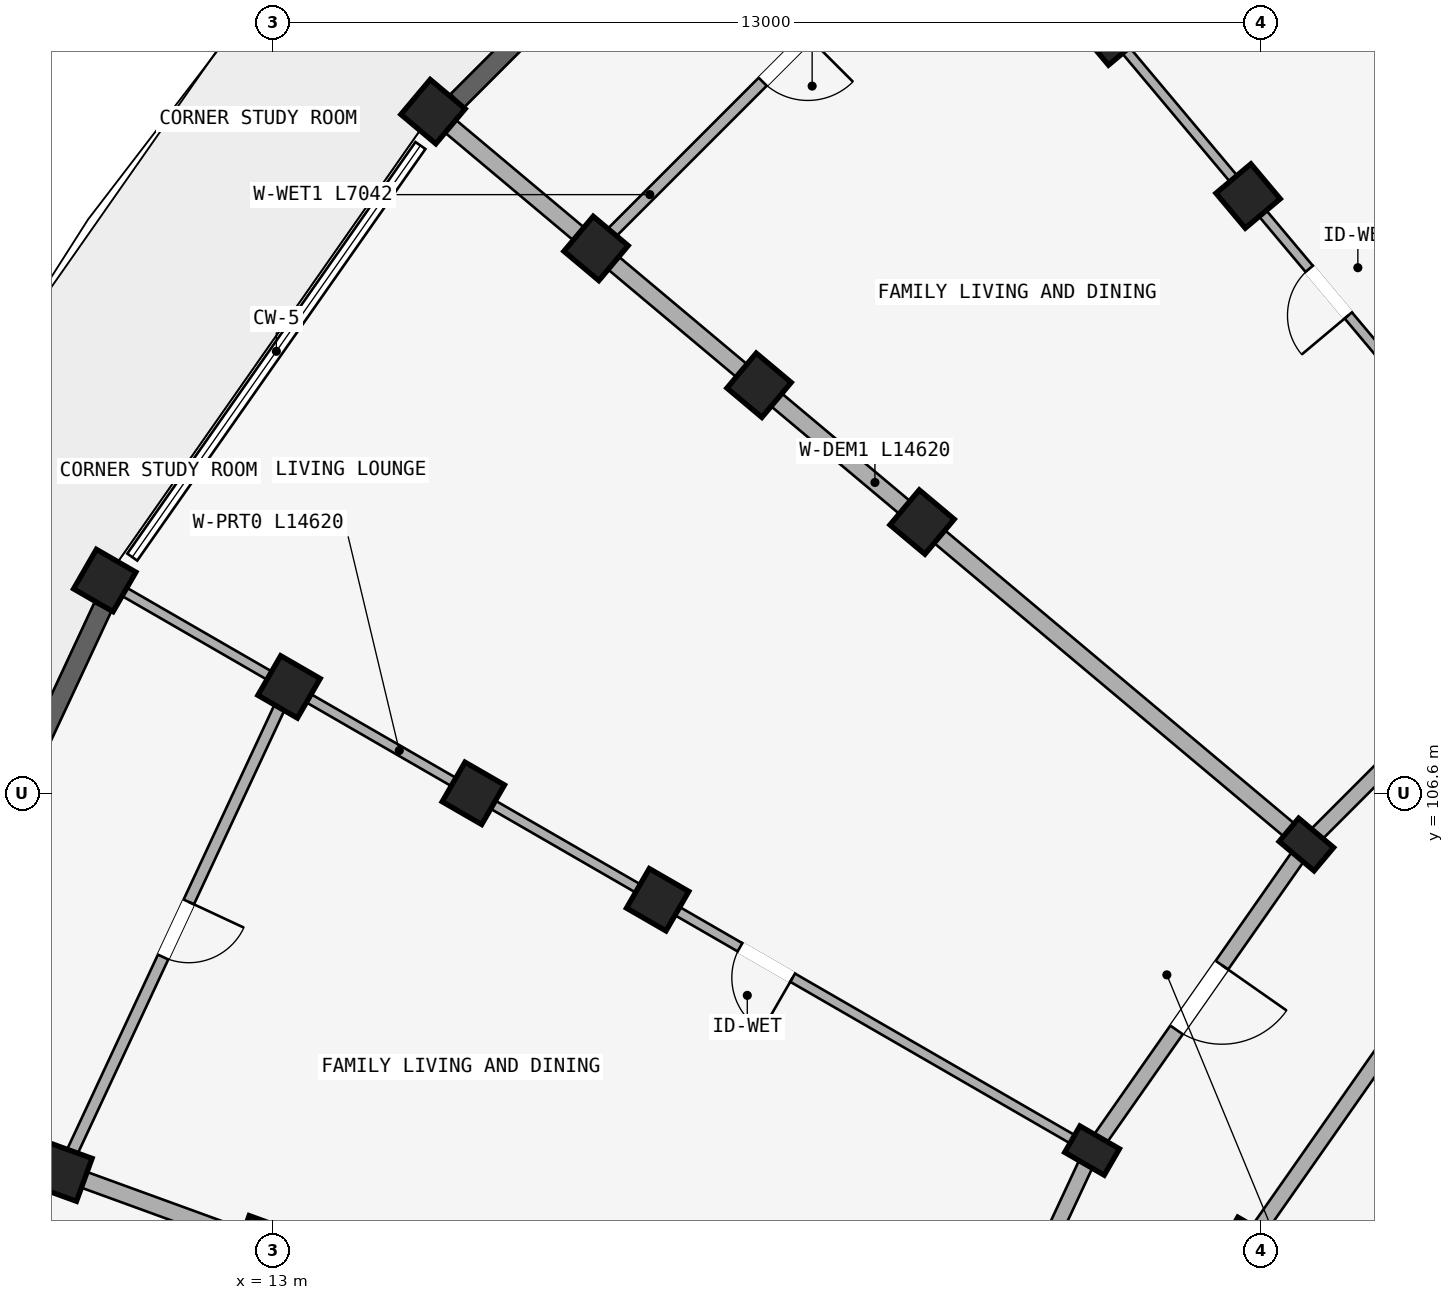
"""IFC4 building model, lengths in metres.
Left out: names, types, materials, properties, quantities, classifications, styles, units other than length and angle.
Written with IfcOpenShell. Run it as: python <this file> out.ifc"""

import sys

from ifc_helpers import new_model, si_unit, direction, frame, frame_2d, origin, origin_2d, place, context, subcontext, project, spatial, rectangle, extrude, element, fill, save


model = new_model("IFC4")
c1 = context("Model", 3, precision=1e-05, world=origin(), true_north=direction((0.0, 1.0)))
c2 = subcontext(c1, "Body", "Model", "MODEL_VIEW")
j1 = project(units=[si_unit("LENGTHUNIT", "METRE"), si_unit("PLANEANGLEUNIT", "RADIAN")], contexts=[c1])
p1 = place(None, origin())
s1 = spatial("IfcSite", under=j1, at=p1, CompositionType="ELEMENT")
p2 = place(p1, origin())
s2 = spatial("IfcBuilding", under=s1, at=p2, CompositionType="ELEMENT")
p3 = place(p2, frame((0.0, 0.0, 40.2)))
s3 = spatial("IfcBuildingStorey", under=s2, at=p3, CompositionType="ELEMENT", Elevation=40.2)
for number, where, z_axis, x_axis in (
    (1, (25.831, 114.458, 0.0), (0.0, 0.0, 1.0), (0.766, 0.643, 0.0)),
    (2, (24.031, 116.603, 0.0), (0.0, 0.0, 1.0), (0.766, 0.643, 0.0)),
):
    element("IfcColumn", number, at=place(p3, frame(where, z_axis=z_axis, x_axis=x_axis)), inside=s3, PredefinedType="COLUMN", context=c2, shape_type="SweptSolid", body=[
        extrude(rectangle(XDim=0.6, YDim=0.6, at=origin_2d()), origin(), (0.0, 0.0, 1.0), 2.93),
    ])
p4 = place(p3, frame((26.598, 105.927, 0.0), z_axis=(0.0, 0.0, 1.0), x_axis=(0.642787609687, 0.766044443119, 0.0)))
e3 = element("IfcColumn", 3, at=p4, inside=s3, PredefinedType="COLUMN", context=c2, shape_type="SweptSolid", body=[
    extrude(rectangle(XDim=0.4, YDim=0.6, at=origin_2d()), origin(), (0.0, 0.0, 1.0), 2.93),
])
for number, where, z_axis, x_axis in (
    (4, (21.542, 110.169, 0.0), (0.0, 0.0, 1.0), (0.643, 0.766, 0.0)),
    (5, (19.397, 111.969, 0.0), (0.0, 0.0, 1.0), (0.643, 0.766, 0.0)),
    (6, (17.252, 113.769, 0.0), (0.0, 0.0, 1.0), (0.643, 0.766, 0.0)),
):
    element("IfcColumn", number, at=place(p3, frame(where, z_axis=z_axis, x_axis=x_axis)), inside=s3, PredefinedType="COLUMN", context=c2, shape_type="SweptSolid", body=[
        extrude(rectangle(XDim=0.6, YDim=0.6, at=origin_2d()), origin(), (0.0, 0.0, 1.0), 2.93),
    ])
p5 = place(p3, frame((15.107, 115.568, 0.0), z_axis=(0.0, 0.0, 1.0), x_axis=(0.642787609687, 0.766044443119, 0.0)))
e7 = element("IfcColumn", 7, at=p5, inside=s3, PredefinedType="COLUMN", context=c2, shape_type="SweptSolid", body=[
    extrude(rectangle(XDim=0.6, YDim=0.6, at=origin_2d()), origin(), (0.0, 0.0, 1.0), 2.97),
])
for number, where, z_axis, x_axis in (
    (8, (25.856, 100.7, 0.0), (0.0, 0.0, 1.0), (0.5, 0.866, 0.0)),
    (9, (23.778, 101.9, 0.0), (0.0, 0.0, 1.0), (0.5, 0.866, 0.0)),
):
    element("IfcColumn", number, at=place(p3, frame(where, z_axis=z_axis, x_axis=x_axis)), inside=s3, PredefinedType="COLUMN", context=c2, shape_type="SweptSolid", body=[
        extrude(rectangle(XDim=0.4, YDim=0.6, at=origin_2d()), origin(), (0.0, 0.0, 1.0), 2.93),
    ])
for number, where, z_axis, x_axis in (
    (10, (18.062, 105.2, 0.0), (0.0, 0.0, 1.0), (0.5, 0.866, 0.0)),
    (11, (15.637, 106.6, 0.0), (0.0, 0.0, 1.0), (0.5, 0.866, 0.0)),
    (12, (13.213, 108.0, 0.0), (0.0, 0.0, 1.0), (0.5, 0.866, 0.0)),
):
    element("IfcColumn", number, at=place(p3, frame(where, z_axis=z_axis, x_axis=x_axis)), inside=s3, PredefinedType="COLUMN", context=c2, shape_type="SweptSolid", body=[
        extrude(rectangle(XDim=0.6, YDim=0.6, at=origin_2d()), origin(), (0.0, 0.0, 1.0), 2.93),
    ])
p6 = place(p3, frame((10.788, 109.4, 0.0), z_axis=(0.0, 0.0, 1.0), x_axis=(0.5, 0.866025403784, 0.0)))
e13 = element("IfcColumn", 13, at=p6, inside=s3, PredefinedType="COLUMN", context=c2, shape_type="SweptSolid", body=[
    extrude(rectangle(XDim=0.6, YDim=0.6, at=origin_2d()), origin(), (0.0, 0.0, 1.0), 2.97),
])
for number, where, z_axis, x_axis in (
    (14, (12.868, 100.66, 0.0), (0.0, 0.0, 1.0), (0.342, 0.94, 0.0)),
    (15, (10.236, 101.618, 0.0), (0.0, 0.0, 1.0), (0.342, 0.94, 0.0)),
):
    element("IfcColumn", number, at=place(p3, frame(where, z_axis=z_axis, x_axis=x_axis)), inside=s3, PredefinedType="COLUMN", context=c2, shape_type="SweptSolid", body=[
        extrude(rectangle(XDim=0.6, YDim=0.6, at=origin_2d()), origin(), (0.0, 0.0, 1.0), 2.93),
    ])
p7 = place(p3, frame((30.073, 109.402, 0.0), z_axis=(0.0, 0.0, 1.0), x_axis=(-0.707106781187, -0.707106781187, 0.0)))
e16 = element("IfcWall", 16, at=p7, inside=s3, PredefinedType="STANDARD", context=c2, shape_type="SweptSolid", body=[
    extrude(rectangle(XDim=4.916, YDim=0.2, at=frame_2d((2.458, 0.0))), origin(), (0.0, 0.0, 1.0), 2.372),
])
p8 = place(p3, frame((28.436, 104.384, 0.0), z_axis=(0.0, 0.0, 1.0), x_axis=(-0.573571637217, -0.819155404658, 0.0)))
e17 = element("IfcWall", 17, at=p8, inside=s3, PredefinedType="STANDARD", context=c2, shape_type="SweptSolid", body=[
    extrude(rectangle(XDim=4.497, YDim=0.2, at=frame_2d((2.249, 0.0))), origin(), (0.0, 0.0, 1.0), 2.372),
])
p9 = place(p3, frame((26.598, 105.927, 0.0), z_axis=(0.0, 0.0, 1.0), x_axis=(-0.573592335331, -0.819140911474, 0.0)))
e18 = element("IfcWall", 18, at=p9, inside=s3, PredefinedType="STANDARD", context=c2, shape_type="SweptSolid", body=[
    extrude(rectangle(XDim=4.916, YDim=0.2, at=frame_2d((2.458, 0.0))), origin(), (0.0, 0.0, 1.0), 2.372),
])
p10 = place(p9, frame((1.938, 0.0, 0.0)))
e19 = element("IfcOpeningElement", 19, at=p10, cuts=e18, PredefinedType="OPENING", context=c2, shape_type="SweptSolid", body=[
    extrude(rectangle(XDim=1.04, YDim=2.15, at=frame_2d((0.52, 1.075))), frame((0.0, 0.11, 0.0), z_axis=(0.0, -1.0, 0.0), x_axis=(1.0, 0.0, 0.0)), (0.0, 0.0, 1.0), 0.22),
])
p11 = place(p3, frame((23.778, 101.9, 0.0), z_axis=(0.0, 0.0, 1.0), x_axis=(-0.422629854778, -0.906302381024, 0.0)))
e20 = element("IfcWall", 20, at=p11, inside=s3, PredefinedType="STANDARD", context=c2, shape_type="SweptSolid", body=[
    extrude(rectangle(XDim=4.915, YDim=0.2, at=frame_2d((2.458, 0.0))), origin(), (0.0, 0.0, 1.0), 2.372),
])
p12 = place(p3, frame((34.05, 112.309, 0.0), z_axis=(0.0, 0.0, 1.0), x_axis=(-0.500007702989, 0.866020956416, 0.0)))
e21 = element("IfcWall", 21, at=p12, inside=s3, PredefinedType="STANDARD", context=c2, shape_type="SweptSolid", body=[
    extrude(rectangle(XDim=14.62, YDim=0.22, at=frame_2d((7.31, 0.0))), origin(), (0.0, 0.0, 1.0), 2.372),
])
p13 = place(p3, frame((30.009, 109.479, 0.0), z_axis=(0.0, 0.0, 1.0), x_axis=(-0.642779216656, 0.76605148563, 0.0)))
e22 = element("IfcWall", 22, at=p13, inside=s3, PredefinedType="PARTITIONING", context=c2, shape_type="SweptSolid", body=[
    extrude(rectangle(XDim=14.62, YDim=0.125, at=frame_2d((7.31, 0.0))), origin(), (0.0, 0.0, 1.0), 2.372),
])
p14 = place(p13, frame((4.449, 0.0, 0.0)))
e23 = element("IfcOpeningElement", 23, at=p14, cuts=e22, PredefinedType="OPENING", context=c2, shape_type="SweptSolid", body=[
    extrude(rectangle(XDim=0.8, YDim=2.1, at=frame_2d((0.4, 1.05))), frame((0.0, 0.073, 0.0), z_axis=(0.0, -1.0, 0.0), x_axis=(1.0, 0.0, 0.0)), (0.0, 0.0, 1.0), 0.145),
])
p15 = place(p3, frame((26.521, 105.991, 0.0), z_axis=(0.0, 0.0, 1.0), x_axis=(-0.76605148563, 0.642779216656, 0.0)))
e24 = element("IfcWall", 24, at=p15, inside=s3, PredefinedType="STANDARD", context=c2, shape_type="SweptSolid", body=[
    extrude(rectangle(XDim=14.62, YDim=0.22, at=frame_2d((7.31, 0.0))), origin(), (0.0, 0.0, 1.0), 2.372),
])
p16 = place(p3, frame((23.691, 101.95, 0.0), z_axis=(0.0, 0.0, 1.0), x_axis=(-0.866020956416, 0.500007702989, 0.0)))
e25 = element("IfcWall", 25, at=p16, inside=s3, PredefinedType="PARTITIONING", context=c2, shape_type="SweptSolid", body=[
    extrude(rectangle(XDim=14.62, YDim=0.125, at=frame_2d((7.31, 0.0))), origin(), (0.0, 0.0, 1.0), 2.372),
])
p17 = place(p16, frame((4.449, 0.0, 0.0)))
e26 = element("IfcOpeningElement", 26, at=p17, cuts=e25, PredefinedType="OPENING", context=c2, shape_type="SweptSolid", body=[
    extrude(rectangle(XDim=0.8, YDim=2.1, at=frame_2d((0.4, 1.05))), frame((0.0, 0.073, 0.0), z_axis=(0.0, -1.0, 0.0), x_axis=(1.0, 0.0, 0.0)), (0.0, 0.0, 1.0), 0.145),
])
p18 = place(p3, frame((21.607, 97.479, 0.0), z_axis=(0.0, 0.0, 1.0), x_axis=(-0.939694408106, 0.342015232663, 0.0)))
e27 = element("IfcWall", 27, at=p18, inside=s3, PredefinedType="STANDARD", context=c2, shape_type="SweptSolid", body=[
    extrude(rectangle(XDim=14.62, YDim=0.22, at=frame_2d((7.31, 0.0))), origin(), (0.0, 0.0, 1.0), 2.372),
])
p19 = place(p3, frame((22.231, 118.748, 0.0), z_axis=(0.0, 0.0, 1.0), x_axis=(-0.707106781187, -0.707106781187, 0.0)))
e28 = element("IfcWall", 28, at=p19, inside=s3, PredefinedType="PLUMBINGWALL", context=c2, shape_type="SweptSolid", body=[
    extrude(rectangle(XDim=7.042, YDim=0.15, at=frame_2d((3.521, 0.0))), origin(), (0.0, 0.0, 1.0), 2.372),
])
p20 = place(p19, frame((3.101, 0.0, 0.0)))
e29 = element("IfcOpeningElement", 29, at=p20, cuts=e28, PredefinedType="OPENING", context=c2, shape_type="SweptSolid", body=[
    extrude(rectangle(XDim=0.84, YDim=2.1, at=frame_2d((0.42, 1.05))), frame((0.0, 0.085, 0.0), z_axis=(0.0, -1.0, 0.0), x_axis=(1.0, 0.0, 0.0)), (0.0, 0.0, 1.0), 0.17),
])
p21 = place(p3, frame((13.213, 108.0, 0.0), z_axis=(0.0, 0.0, 1.0), x_axis=(-0.422640621205, -0.906297360311, 0.0)))
e30 = element("IfcWall", 30, at=p21, inside=s3, PredefinedType="PLUMBINGWALL", context=c2, shape_type="SweptSolid", body=[
    extrude(rectangle(XDim=7.042, YDim=0.15, at=frame_2d((3.521, 0.0))), origin(), (0.0, 0.0, 1.0), 2.372),
])
p22 = place(p21, frame((3.121, 0.0, 0.0)))
e31 = element("IfcOpeningElement", 31, at=p22, cuts=e30, PredefinedType="OPENING", context=c2, shape_type="SweptSolid", body=[
    extrude(rectangle(XDim=0.8, YDim=2.1, at=frame_2d((0.4, 1.05))), frame((0.0, 0.085, 0.0), z_axis=(0.0, -1.0, 0.0), x_axis=(1.0, 0.0, 0.0)), (0.0, 0.0, 1.0), 0.17),
])
p23 = place(p3, frame((20.29, 120.574, 0.0), z_axis=(0.0, 0.0, 1.0), x_axis=(-0.707106781187, -0.707106781187, 0.0)))
e32 = element("IfcWall", 32, at=p23, inside=s3, PredefinedType="STANDARD", context=c2, shape_type="SweptSolid", body=[
    extrude(rectangle(XDim=6.879, YDim=0.25, at=frame_2d((3.439, 0.0))), origin(), (0.0, 0.0, 1.0), 2.48),
])
p24 = place(p23, frame((4.479, 0.0, 0.53)))
e33 = element("IfcOpeningElement", 33, at=p24, cuts=e32, PredefinedType="OPENING", context=c2, shape_type="SweptSolid", body=[
    extrude(rectangle(XDim=1.2, YDim=1.5, at=frame_2d((0.6, 0.75))), frame((0.0, 0.135, 0.0), z_axis=(0.0, -1.0, 0.0), x_axis=(1.0, 0.0, 0.0)), (0.0, 0.0, 1.0), 0.27),
])
p25 = place(p23, frame((1.778, 0.0, 0.0)))
e34 = element("IfcOpeningElement", 34, at=p25, cuts=e32, PredefinedType="OPENING", context=c2, shape_type="SweptSolid", body=[
    extrude(rectangle(XDim=1.26, YDim=2.15, at=frame_2d((0.63, 1.075))), frame((0.0, 0.135, 0.0), z_axis=(0.0, -1.0, 0.0), x_axis=(1.0, 0.0, 0.0)), (0.0, 0.0, 1.0), 0.27),
])
p26 = place(p3, frame((10.763, 109.052, 0.0), z_axis=(0.0, 0.0, 1.0), x_axis=(-0.422628979279, -0.906302789289, 0.0)))
e35 = element("IfcWall", 35, at=p26, inside=s3, PredefinedType="STANDARD", context=c2, shape_type="SweptSolid", body=[
    extrude(rectangle(XDim=6.879, YDim=0.25, at=frame_2d((3.439, 0.0))), origin(), (0.0, 0.0, 1.0), 2.48),
])
p27 = place(p26, frame((2.34, 0.0, 0.38)))
e36 = element("IfcOpeningElement", 36, at=p27, cuts=e35, PredefinedType="OPENING", context=c2, shape_type="SweptSolid", body=[
    extrude(rectangle(XDim=2.2, YDim=1.9, at=frame_2d((1.1, 0.95))), frame((0.0, 0.135, 0.0), z_axis=(0.0, -1.0, 0.0), x_axis=(1.0, 0.0, 0.0)), (0.0, 0.0, 1.0), 0.27),
])
p28 = place(p14, origin())
e37 = element("IfcDoor", 37, at=p28, inside=s3, OperationType="SINGLE_SWING_LEFT", PredefinedType="DOOR", context=c2, shape_type="SweptSolid", body=[
    extrude(rectangle(XDim=0.8, YDim=2.1, at=frame_2d((0.4, 1.05))), frame((0.0, 0.025, 0.0), z_axis=(0.0, -1.0, 0.0), x_axis=(1.0, 0.0, 0.0)), (0.0, 0.0, 1.0), 0.05),
])
fill(e23, e37)
p29 = place(p17, frame((0.8, 0.0, 0.0), z_axis=(0.0, 0.0, 1.0), x_axis=(-1.0, 0.0, 0.0)))
e38 = element("IfcDoor", 38, at=p29, inside=s3, OperationType="SINGLE_SWING_RIGHT", PredefinedType="DOOR", context=c2, shape_type="SweptSolid", body=[
    extrude(rectangle(XDim=0.8, YDim=2.1, at=frame_2d((0.4, 1.05))), frame((0.0, 0.025, 0.0), z_axis=(0.0, -1.0, 0.0), x_axis=(1.0, 0.0, 0.0)), (0.0, 0.0, 1.0), 0.05),
])
fill(e26, e38)
p30 = place(p20, frame((0.84, 0.0, 0.0), z_axis=(0.0, 0.0, 1.0), x_axis=(-1.0, 0.0, 0.0)))
e39 = element("IfcDoor", 39, at=p30, inside=s3, OperationType="SINGLE_SWING_RIGHT", PredefinedType="DOOR", context=c2, shape_type="SweptSolid", body=[
    extrude(rectangle(XDim=0.84, YDim=2.1, at=frame_2d((0.42, 1.05))), frame((0.0, 0.025, 0.0), z_axis=(0.0, -1.0, 0.0), x_axis=(1.0, 0.0, 0.0)), (0.0, 0.0, 1.0), 0.05),
])
fill(e29, e39)
p31 = place(p10, origin())
e40 = element("IfcDoor", 40, at=p31, inside=s3, OperationType="SINGLE_SWING_LEFT", PredefinedType="DOOR", context=c2, shape_type="SweptSolid", body=[
    extrude(rectangle(XDim=1.04, YDim=2.15, at=frame_2d((0.52, 1.075))), frame((0.0, 0.025, 0.0), z_axis=(0.0, -1.0, 0.0), x_axis=(1.0, 0.0, 0.0)), (0.0, 0.0, 1.0), 0.05),
])
fill(e19, e40)
p32 = place(p22, frame((0.8, 0.0, 0.0), z_axis=(0.0, 0.0, 1.0), x_axis=(-1.0, 0.0, 0.0)))
e41 = element("IfcDoor", 41, at=p32, inside=s3, OperationType="SINGLE_SWING_RIGHT", PredefinedType="DOOR", context=c2, shape_type="SweptSolid", body=[
    extrude(rectangle(XDim=0.8, YDim=2.1, at=frame_2d((0.4, 1.05))), frame((0.0, 0.025, 0.0), z_axis=(0.0, -1.0, 0.0), x_axis=(1.0, 0.0, 0.0)), (0.0, 0.0, 1.0), 0.05),
])
fill(e31, e41)
save(model, sys.argv[1])
